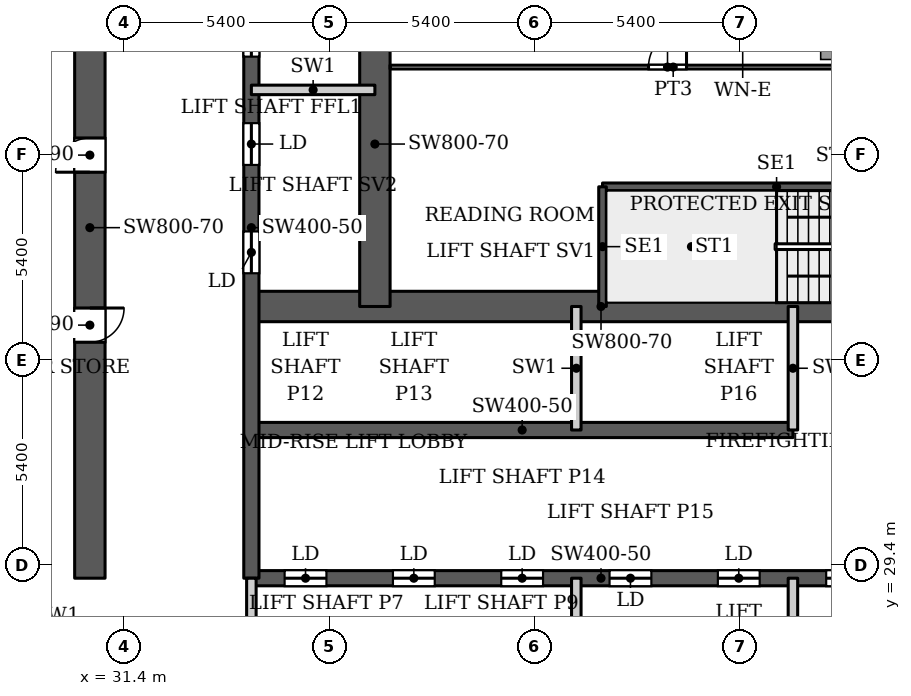
"""IFC4 building model, lengths in metres.
Left out: names, types, materials, properties, quantities, classifications, styles, units other than length and angle.
Written with IfcOpenShell. Run it as: python <this file> out.ifc"""

import sys

from ifc_helpers import new_model, si_unit, direction, frame, frame_2d, origin, place, context, subcontext, project, spatial, rectangle, extrude, source, transform, mapped, element, fill, save


model = new_model("IFC4")
c1 = context("Model", 3, precision=1e-05, world=origin(), true_north=direction((0.0, 1.0)))
c2 = subcontext(c1, "Body", "Model", "MODEL_VIEW")
j1 = project(units=[si_unit("LENGTHUNIT", "METRE"), si_unit("PLANEANGLEUNIT", "RADIAN")], contexts=[c1])
p1 = place(None, origin())
s1 = spatial("IfcSite", under=j1, at=p1, CompositionType="ELEMENT")
p2 = place(p1, origin())
s2 = spatial("IfcBuilding", under=s1, at=p2, CompositionType="ELEMENT")
p3 = place(p2, frame((0.0, 0.0, 179.9)))
s3 = spatial("IfcBuildingStorey", under=s2, at=p3, CompositionType="ELEMENT", Elevation=179.9)
p4 = place(p3, frame((34.75, 29.05, 0.0), z_axis=(0.0, 0.0, 1.0), x_axis=(1.0, 0.0, 0.0)))
e1 = element("IfcWall", 1, at=p4, inside=s3, PredefinedType="SHEAR", context=c2, shape_type="SweptSolid", body=[
    extrude(rectangle(XDim=18.4, YDim=0.4, at=frame_2d((9.2, 0.0))), origin(), (0.0, 0.0, 1.0), 3.9),
])
p5 = place(p4, frame((0.875, 0.0, 0.0)))
e2 = element("IfcOpeningElement", 2, at=p5, cuts=e1, PredefinedType="OPENING", context=c2, shape_type="SweptSolid", body=[
    extrude(rectangle(XDim=1.1, YDim=2.2, at=frame_2d((0.55, 1.1))), frame((0.0, 0.21, 0.0), z_axis=(0.0, -1.0, 0.0), x_axis=(1.0, 0.0, 0.0)), (0.0, 0.0, 1.0), 0.42),
])
p6 = place(p4, frame((3.725, 0.0, 0.0)))
e3 = element("IfcOpeningElement", 3, at=p6, cuts=e1, PredefinedType="OPENING", context=c2, shape_type="SweptSolid", body=[
    extrude(rectangle(XDim=1.1, YDim=2.2, at=frame_2d((0.55, 1.1))), frame((0.0, 0.21, 0.0), z_axis=(0.0, -1.0, 0.0), x_axis=(1.0, 0.0, 0.0)), (0.0, 0.0, 1.0), 0.42),
])
p7 = place(p4, frame((6.575, 0.0, 0.0)))
e4 = element("IfcOpeningElement", 4, at=p7, cuts=e1, PredefinedType="OPENING", context=c2, shape_type="SweptSolid", body=[
    extrude(rectangle(XDim=1.1, YDim=2.2, at=frame_2d((0.55, 1.1))), frame((0.0, 0.21, 0.0), z_axis=(0.0, -1.0, 0.0), x_axis=(1.0, 0.0, 0.0)), (0.0, 0.0, 1.0), 0.42),
])
p8 = place(p4, frame((9.425, 0.0, 0.0)))
e5 = element("IfcOpeningElement", 5, at=p8, cuts=e1, PredefinedType="OPENING", context=c2, shape_type="SweptSolid", body=[
    extrude(rectangle(XDim=1.1, YDim=2.2, at=frame_2d((0.55, 1.1))), frame((0.0, 0.21, 0.0), z_axis=(0.0, -1.0, 0.0), x_axis=(1.0, 0.0, 0.0)), (0.0, 0.0, 1.0), 0.42),
])
p9 = place(p4, frame((12.275, 0.0, 0.0)))
e6 = element("IfcOpeningElement", 6, at=p9, cuts=e1, PredefinedType="OPENING", context=c2, shape_type="SweptSolid", body=[
    extrude(rectangle(XDim=1.1, YDim=2.2, at=frame_2d((0.55, 1.1))), frame((0.0, 0.21, 0.0), z_axis=(0.0, -1.0, 0.0), x_axis=(1.0, 0.0, 0.0)), (0.0, 0.0, 1.0), 0.42),
])
p10 = place(p4, frame((15.125, 0.0, 0.0)))
e7 = element("IfcOpeningElement", 7, at=p10, cuts=e1, PredefinedType="OPENING", context=c2, shape_type="SweptSolid", body=[
    extrude(rectangle(XDim=1.1, YDim=2.2, at=frame_2d((0.55, 1.1))), frame((0.0, 0.21, 0.0), z_axis=(0.0, -1.0, 0.0), x_axis=(1.0, 0.0, 0.0)), (0.0, 0.0, 1.0), 0.42),
])
p11 = place(p3, frame((34.75, 32.95, 0.0), z_axis=(0.0, 0.0, 1.0), x_axis=(1.0, 0.0, 0.0)))
e8 = element("IfcWall", 8, at=p11, inside=s3, PredefinedType="SHEAR", context=c2, shape_type="SweptSolid", body=[
    extrude(rectangle(XDim=14.25, YDim=0.4, at=frame_2d((7.125, 0.0))), origin(), (0.0, 0.0, 1.0), 3.9),
])
p12 = place(p3, frame((34.75, 36.2, 0.0), z_axis=(0.0, 0.0, 1.0), x_axis=(1.0, 0.0, 0.0)))
e9 = element("IfcWall", 9, at=p12, inside=s3, PredefinedType="SHEAR", context=c2, shape_type="SweptSolid", body=[
    extrude(rectangle(XDim=18.4, YDim=0.8, at=frame_2d((9.2, 0.0))), origin(), (0.0, 0.0, 1.0), 3.9),
])
p13 = place(p12, frame((16.9, 0.0, 0.0)))
e10 = element("IfcOpeningElement", 10, at=p13, cuts=e9, PredefinedType="OPENING", context=c2, shape_type="SweptSolid", body=[
    extrude(rectangle(XDim=1.0, YDim=2.2, at=frame_2d((0.5, 1.1))), frame((0.0, 0.41, 0.0), z_axis=(0.0, -1.0, 0.0), x_axis=(1.0, 0.0, 0.0)), (0.0, 0.0, 1.0), 0.82),
])
p14 = place(p3, frame((34.75, 29.05, 0.0), z_axis=(0.0, 0.0, 1.0), x_axis=(0.0, 1.0, 0.0)))
e11 = element("IfcWall", 11, at=p14, inside=s3, PredefinedType="SHEAR", context=c2, shape_type="SweptSolid", body=[
    extrude(rectangle(XDim=18.45, YDim=0.4, at=frame_2d((9.225, 0.0))), origin(), (0.0, 0.0, 1.0), 3.9),
])
p15 = place(p14, frame((8.025, 0.0, 0.0)))
e12 = element("IfcOpeningElement", 12, at=p15, cuts=e11, PredefinedType="OPENING", context=c2, shape_type="SweptSolid", body=[
    extrude(rectangle(XDim=1.1, YDim=2.2, at=frame_2d((0.55, 1.1))), frame((0.0, 0.21, 0.0), z_axis=(0.0, -1.0, 0.0), x_axis=(1.0, 0.0, 0.0)), (0.0, 0.0, 1.0), 0.42),
])
p16 = place(p14, frame((10.875, 0.0, 0.0)))
e13 = element("IfcOpeningElement", 13, at=p16, cuts=e11, PredefinedType="OPENING", context=c2, shape_type="SweptSolid", body=[
    extrude(rectangle(XDim=1.1, YDim=2.2, at=frame_2d((0.55, 1.1))), frame((0.0, 0.21, 0.0), z_axis=(0.0, -1.0, 0.0), x_axis=(1.0, 0.0, 0.0)), (0.0, 0.0, 1.0), 0.42),
])
p17 = place(p14, frame((13.725, 0.0, 0.0)))
e14 = element("IfcOpeningElement", 14, at=p17, cuts=e11, PredefinedType="OPENING", context=c2, shape_type="SweptSolid", body=[
    extrude(rectangle(XDim=1.1, YDim=2.2, at=frame_2d((0.55, 1.1))), frame((0.0, 0.21, 0.0), z_axis=(0.0, -1.0, 0.0), x_axis=(1.0, 0.0, 0.0)), (0.0, 0.0, 1.0), 0.42),
])
p18 = place(p14, frame((15.95, 0.0, 0.0)))
e15 = element("IfcOpeningElement", 15, at=p18, cuts=e11, PredefinedType="OPENING", context=c2, shape_type="SweptSolid", body=[
    extrude(rectangle(XDim=1.1, YDim=2.2, at=frame_2d((0.55, 1.1))), frame((0.0, 0.21, 0.0), z_axis=(0.0, -1.0, 0.0), x_axis=(1.0, 0.0, 0.0)), (0.0, 0.0, 1.0), 0.42),
])
p19 = place(p3, frame((38.0, 36.2, 0.0), z_axis=(0.0, 0.0, 1.0), x_axis=(0.0, 1.0, 0.0)))
e16 = element("IfcWall", 16, at=p19, inside=s3, PredefinedType="SHEAR", context=c2, shape_type="SweptSolid", body=[
    extrude(rectangle(XDim=8.55, YDim=0.8, at=frame_2d((4.275, 0.0))), origin(), (0.0, 0.0, 1.0), 3.9),
])
p20 = place(p3, frame((30.5, 29.05, 0.0), z_axis=(0.0, 0.0, 1.0), x_axis=(0.0, 1.0, 0.0)))
e17 = element("IfcWall", 17, at=p20, inside=s3, PredefinedType="SHEAR", context=c2, shape_type="SweptSolid", body=[
    extrude(rectangle(XDim=18.45, YDim=0.8, at=frame_2d((9.225, 0.0))), origin(), (0.0, 0.0, 1.0), 3.9),
])
p21 = place(p20, frame((6.21, 0.0, 0.0)))
e18 = element("IfcOpeningElement", 18, at=p21, cuts=e17, PredefinedType="OPENING", context=c2, shape_type="SweptSolid", body=[
    extrude(rectangle(XDim=0.9, YDim=2.2, at=frame_2d((0.45, 1.1))), frame((0.0, 0.41, 0.0), z_axis=(0.0, -1.0, 0.0), x_axis=(1.0, 0.0, 0.0)), (0.0, 0.0, 1.0), 0.82),
])
p22 = place(p20, frame((10.684, 0.0, 0.0)))
e19 = element("IfcOpeningElement", 19, at=p22, cuts=e17, PredefinedType="OPENING", context=c2, shape_type="SweptSolid", body=[
    extrude(rectangle(XDim=0.9, YDim=2.2, at=frame_2d((0.45, 1.1))), frame((0.0, 0.41, 0.0), z_axis=(0.0, -1.0, 0.0), x_axis=(1.0, 0.0, 0.0)), (0.0, 0.0, 1.0), 0.82),
])
p23 = place(p3, frame((29.712, 26.072, 0.0), z_axis=(0.0, 0.0, 1.0), x_axis=(-0.511028049012, 0.859564036662, 0.0)))
e20 = element("IfcWall", 20, at=p23, inside=s3, PredefinedType="SOLIDWALL", context=c2, shape_type="SweptSolid", body=[
    extrude(rectangle(XDim=4.634, YDim=0.25, at=frame_2d((2.317, 0.0))), origin(), (0.0, 0.0, 1.0), 3.147),
])
p24 = place(p3, frame((27.195, 31.969, 0.0), z_axis=(0.0, 0.0, 1.0), x_axis=(0.052554995867, 0.998618031286, 0.0)))
e21 = element("IfcWall", 21, at=p24, inside=s3, PredefinedType="SOLIDWALL", context=c2, shape_type="SweptSolid", body=[
    extrude(rectangle(XDim=66.787, YDim=0.25, at=frame_2d((33.394, 0.0))), origin(), (0.0, 0.0, 1.0), 3.75),
])
p25 = place(p3, frame((43.99, 39.35, 0.0), z_axis=(0.0, 0.0, 1.0), x_axis=(1.0, 0.0, 0.0)))
e22 = element("IfcWall", 22, at=p25, inside=s3, PredefinedType="SHEAR", context=c2, shape_type="SweptSolid", body=[
    extrude(rectangle(XDim=9.16, YDim=0.2, at=frame_2d((4.58, 0.0))), origin(), (0.0, 0.0, 1.0), 3.9),
])
p26 = place(p3, frame((43.99, 36.2, 0.0), z_axis=(0.0, 0.0, 1.0), x_axis=(0.0, 1.0, 0.0)))
e23 = element("IfcWall", 23, at=p26, inside=s3, PredefinedType="SHEAR", context=c2, shape_type="SweptSolid", body=[
    extrude(rectangle(XDim=3.15, YDim=0.2, at=frame_2d((1.575, 0.0))), origin(), (0.0, 0.0, 1.0), 3.9),
])
for number, where, z_axis, x_axis in (
    (24, (34.75, 25.8, 0.0), (0.0, 0.0, 1.0), (0.0, 1.0, 0.0)),
    (25, (43.3, 25.8, 0.0), (0.0, 0.0, 1.0), (0.0, 1.0, 0.0)),
    (26, (43.3, 32.95, 0.0), (0.0, 0.0, 1.0), (0.0, 1.0, 0.0)),
    (27, (49.0, 25.8, 0.0), (0.0, 0.0, 1.0), (0.0, 1.0, 0.0)),
    (28, (49.0, 32.95, 0.0), (0.0, 0.0, 1.0), (0.0, 1.0, 0.0)),
    (29, (34.75, 41.9, 0.0), (0.0, 0.0, 1.0), (1.0, 0.0, 0.0)),
):
    element("IfcWall", number, at=place(p3, frame(where, z_axis=z_axis, x_axis=x_axis)), inside=s3, PredefinedType="PARTITIONING", context=c2, shape_type="SweptSolid", body=[
        extrude(rectangle(XDim=3.25, YDim=0.25, at=frame_2d((1.625, 0.0))), origin(), (0.0, 0.0, 1.0), 3.9),
    ])
p27 = place(p3, frame((38.399, 42.5, 0.0), z_axis=(0.0, 0.0, 1.0), x_axis=(1.0, 0.0, 0.0)))
e30 = element("IfcWall", 30, at=p27, inside=s3, PredefinedType="PARTITIONING", context=c2, shape_type="SweptSolid", body=[
    extrude(rectangle(XDim=14.901, YDim=0.1, at=frame_2d((7.451, 0.0))), origin(), (0.0, 0.0, 1.0), 3.6),
])
p28 = place(p27, frame((6.801, 0.0, 0.0)))
e31 = element("IfcOpeningElement", 31, at=p28, cuts=e30, PredefinedType="OPENING", context=c2, shape_type="SweptSolid", body=[
    extrude(rectangle(XDim=1.0, YDim=2.1, at=frame_2d((0.5, 1.05))), frame((0.0, 0.06, 0.0), z_axis=(0.0, -1.0, 0.0), x_axis=(1.0, 0.0, 0.0)), (0.0, 0.0, 1.0), 0.12),
])
m1 = source(origin(), c2, "Body", "SweptSolid", [
    extrude(rectangle(XDim=1.1, YDim=2.2, at=frame_2d((0.55, 1.1))), frame((0.0, 0.025, 0.0), z_axis=(0.0, -1.0, 0.0), x_axis=(1.0, 0.0, 0.0)), (0.0, 0.0, 1.0), 0.05),
])
p29 = place(p5, origin())
e32 = element("IfcDoor", 32, at=p29, inside=s3, OperationType="SLIDING_TO_LEFT", PredefinedType="DOOR", context=c2, shape_type="MappedRepresentation", body=[
    mapped(m1, transform((0.0, 0.0, 0.0), x_axis=(1.0, 0.0, 0.0), y_axis=(0.0, 1.0, 0.0), z_axis=(0.0, 0.0, 1.0), scale=1.0)),
])
fill(e2, e32)
p30 = place(p6, origin())
e33 = element("IfcDoor", 33, at=p30, inside=s3, OperationType="SLIDING_TO_LEFT", PredefinedType="DOOR", context=c2, shape_type="MappedRepresentation", body=[
    mapped(m1, transform((0.0, 0.0, 0.0), x_axis=(1.0, 0.0, 0.0), y_axis=(0.0, 1.0, 0.0), z_axis=(0.0, 0.0, 1.0), scale=1.0)),
])
fill(e3, e33)
p31 = place(p7, origin())
e34 = element("IfcDoor", 34, at=p31, inside=s3, OperationType="SLIDING_TO_LEFT", PredefinedType="DOOR", context=c2, shape_type="MappedRepresentation", body=[
    mapped(m1, transform((0.0, 0.0, 0.0), x_axis=(1.0, 0.0, 0.0), y_axis=(0.0, 1.0, 0.0), z_axis=(0.0, 0.0, 1.0), scale=1.0)),
])
fill(e4, e34)
p32 = place(p8, origin())
e35 = element("IfcDoor", 35, at=p32, inside=s3, OperationType="SLIDING_TO_LEFT", PredefinedType="DOOR", context=c2, shape_type="MappedRepresentation", body=[
    mapped(m1, transform((0.0, 0.0, 0.0), x_axis=(1.0, 0.0, 0.0), y_axis=(0.0, 1.0, 0.0), z_axis=(0.0, 0.0, 1.0), scale=1.0)),
])
fill(e5, e35)
p33 = place(p9, origin())
e36 = element("IfcDoor", 36, at=p33, inside=s3, OperationType="SLIDING_TO_LEFT", PredefinedType="DOOR", context=c2, shape_type="MappedRepresentation", body=[
    mapped(m1, transform((0.0, 0.0, 0.0), x_axis=(1.0, 0.0, 0.0), y_axis=(0.0, 1.0, 0.0), z_axis=(0.0, 0.0, 1.0), scale=1.0)),
])
fill(e6, e36)
p34 = place(p15, origin())
e37 = element("IfcDoor", 37, at=p34, inside=s3, OperationType="SLIDING_TO_LEFT", PredefinedType="DOOR", context=c2, shape_type="MappedRepresentation", body=[
    mapped(m1, transform((0.0, 0.0, 0.0), x_axis=(1.0, 0.0, 0.0), y_axis=(0.0, 1.0, 0.0), z_axis=(0.0, 0.0, 1.0), scale=1.0)),
])
fill(e12, e37)
p35 = place(p16, origin())
e38 = element("IfcDoor", 38, at=p35, inside=s3, OperationType="SLIDING_TO_LEFT", PredefinedType="DOOR", context=c2, shape_type="MappedRepresentation", body=[
    mapped(m1, transform((0.0, 0.0, 0.0), x_axis=(1.0, 0.0, 0.0), y_axis=(0.0, 1.0, 0.0), z_axis=(0.0, 0.0, 1.0), scale=1.0)),
])
fill(e13, e38)
p36 = place(p17, origin())
e39 = element("IfcDoor", 39, at=p36, inside=s3, OperationType="SLIDING_TO_LEFT", PredefinedType="DOOR", context=c2, shape_type="MappedRepresentation", body=[
    mapped(m1, transform((0.0, 0.0, 0.0), x_axis=(1.0, 0.0, 0.0), y_axis=(0.0, 1.0, 0.0), z_axis=(0.0, 0.0, 1.0), scale=1.0)),
])
fill(e14, e39)
p37 = place(p10, origin())
e40 = element("IfcDoor", 40, at=p37, inside=s3, OperationType="SLIDING_TO_LEFT", PredefinedType="DOOR", context=c2, shape_type="MappedRepresentation", body=[
    mapped(m1, transform((0.0, 0.0, 0.0), x_axis=(1.0, 0.0, 0.0), y_axis=(0.0, 1.0, 0.0), z_axis=(0.0, 0.0, 1.0), scale=1.0)),
])
fill(e7, e40)
m2 = source(origin(), c2, "Body", "SweptSolid", [
    extrude(rectangle(XDim=0.9, YDim=2.2, at=frame_2d((0.45, 1.1))), frame((0.0, 0.025, 0.0), z_axis=(0.0, -1.0, 0.0), x_axis=(1.0, 0.0, 0.0)), (0.0, 0.0, 1.0), 0.05),
])
p38 = place(p21, origin())
e41 = element("IfcDoor", 41, at=p38, inside=s3, OperationType="SINGLE_SWING_RIGHT", PredefinedType="DOOR", context=c2, shape_type="MappedRepresentation", body=[
    mapped(m2, transform((0.0, 0.0, 0.0), x_axis=(1.0, 0.0, 0.0), y_axis=(0.0, 1.0, 0.0), z_axis=(0.0, 0.0, 1.0), scale=1.0)),
])
fill(e18, e41)
p39 = place(p22, origin())
e42 = element("IfcDoor", 42, at=p39, inside=s3, OperationType="SINGLE_SWING_LEFT", PredefinedType="DOOR", context=c2, shape_type="MappedRepresentation", body=[
    mapped(m2, transform((0.0, 0.0, 0.0), x_axis=(1.0, 0.0, 0.0), y_axis=(0.0, 1.0, 0.0), z_axis=(0.0, 0.0, 1.0), scale=1.0)),
])
fill(e19, e42)
m3 = source(origin(), c2, "Body", "SweptSolid", [
    extrude(rectangle(XDim=1.0, YDim=2.1, at=frame_2d((0.5, 1.05))), frame((0.0, 0.025, 0.0), z_axis=(0.0, -1.0, 0.0), x_axis=(1.0, 0.0, 0.0)), (0.0, 0.0, 1.0), 0.05),
])
p40 = place(p28, origin())
e43 = element("IfcDoor", 43, at=p40, inside=s3, OperationType="SINGLE_SWING_LEFT", PredefinedType="DOOR", context=c2, shape_type="MappedRepresentation", body=[
    mapped(m3, transform((0.0, 0.0, 0.0), x_axis=(1.0, 0.0, 0.0), y_axis=(0.0, 1.0, 0.0), z_axis=(0.0, 0.0, 1.0), scale=1.0)),
])
fill(e31, e43)
save(model, sys.argv[1])
